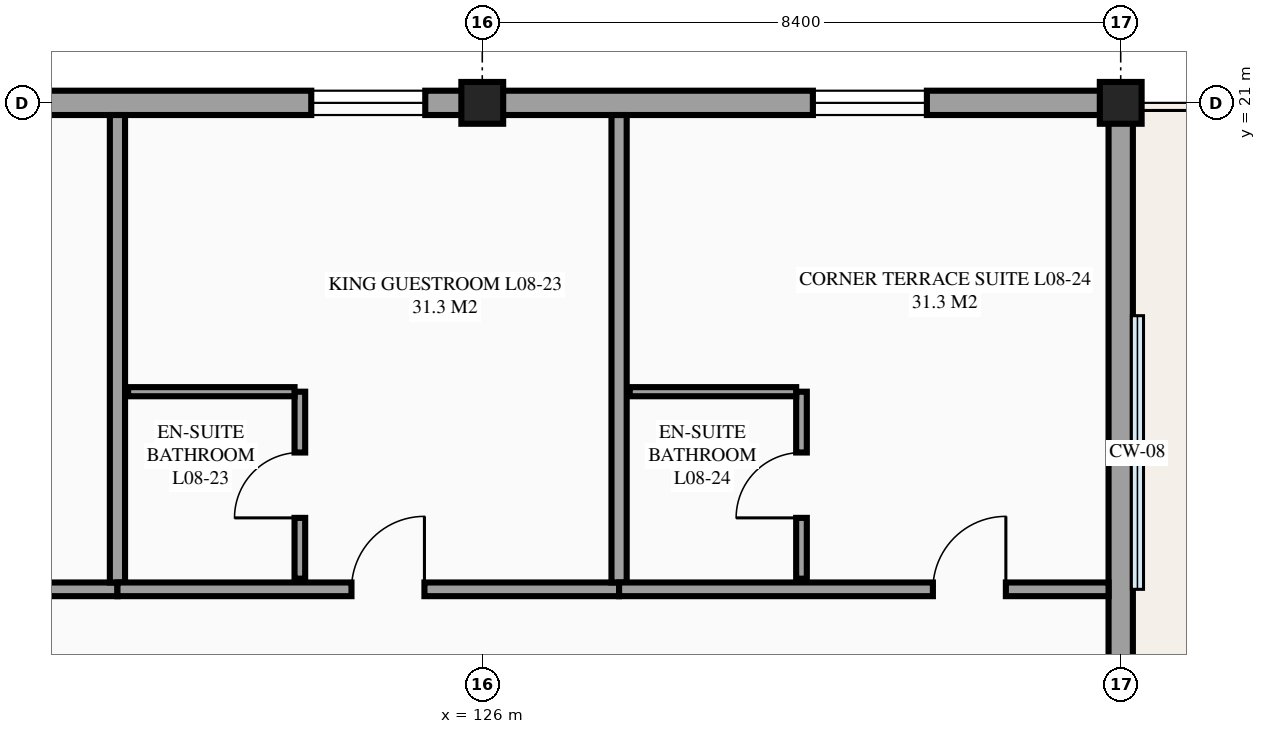
"""IFC4 building model, lengths in metres.
Left out: names, types, materials, properties, quantities, classifications, styles, units other than length and angle.
Written with IfcOpenShell. Run it as: python <this file> out.ifc"""

import sys

from ifc_helpers import new_model, si_unit, direction, frame, frame_2d, origin, origin_2d, place, context, subcontext, project, spatial, rectangle, extrude, element, fill, save


model = new_model("IFC4")
c1 = context("Model", 3, precision=1e-05, world=origin(), true_north=direction((0.0, 1.0)))
c2 = subcontext(c1, "Body", "Model", "MODEL_VIEW")
j1 = project(units=[si_unit("LENGTHUNIT", "METRE"), si_unit("PLANEANGLEUNIT", "RADIAN")], contexts=[c1])
p1 = place(None, origin())
s1 = spatial("IfcSite", under=j1, at=p1, CompositionType="ELEMENT")
p2 = place(p1, origin())
s2 = spatial("IfcBuilding", under=s1, at=p2, CompositionType="ELEMENT")
p3 = place(p2, frame((0.0, 0.0, 32.7)))
s3 = spatial("IfcBuildingStorey", under=s2, at=p3, CompositionType="ELEMENT", Elevation=32.7)
for number, where, z_axis, x_axis in (
    (1, (126.0, 21.0, 0.0), (0.0, 0.0, 1.0), (1.0, 0.0, 0.0)),
    (2, (134.4, 21.0, 0.0), (0.0, 0.0, 1.0), (1.0, 0.0, 0.0)),
):
    element("IfcColumn", number, at=place(p3, frame(where, z_axis=z_axis, x_axis=x_axis)), inside=s3, PredefinedType="COLUMN", context=c2, shape_type="SweptSolid", body=[
        extrude(rectangle(XDim=0.55, YDim=0.55, at=origin_2d()), origin(), (0.0, 0.0, 1.0), 3.6),
    ])
p4 = place(p3, frame((134.4, 4.2, 0.0), z_axis=(0.0, 0.0, 1.0), x_axis=(0.0, 1.0, 0.0)))
e3 = element("IfcWall", 3, at=p4, inside=s3, PredefinedType="STANDARD", context=c2, shape_type="SweptSolid", body=[
    extrude(rectangle(XDim=16.8, YDim=0.32, at=frame_2d((8.4, 0.0))), origin(), (0.0, 0.0, 1.0), 2.63),
])
p5 = place(p4, frame((4.8, 0.0, 0.0), z_axis=(0.0, 0.0, 1.0), x_axis=(-1.0, 0.0, 0.0)))
e4 = element("IfcOpeningElement", 4, at=p5, cuts=e3, PredefinedType="OPENING", context=c2, shape_type="SweptSolid", body=[
    extrude(rectangle(XDim=1.2, YDim=2.2, at=frame_2d((0.6, 1.1))), frame((0.0, 0.17, 0.0), z_axis=(0.0, -1.0, 0.0), x_axis=(1.0, 0.0, 0.0)), (0.0, 0.0, 1.0), 0.34),
])
p6 = place(p3, frame((134.4, 21.0, 0.0), z_axis=(0.0, 0.0, 1.0), x_axis=(-1.0, 0.0, 0.0)))
e5 = element("IfcWall", 5, at=p6, inside=s3, PredefinedType="STANDARD", context=c2, shape_type="SweptSolid", body=[
    extrude(rectangle(XDim=16.8, YDim=0.32, at=frame_2d((8.4, 0.0))), origin(), (0.0, 0.0, 1.0), 2.63),
])
p7 = place(p6, frame((14.5, 0.0, 0.85)))
e6 = element("IfcOpeningElement", 6, at=p7, cuts=e5, PredefinedType="OPENING", context=c2, shape_type="SweptSolid", body=[
    extrude(rectangle(XDim=1.5, YDim=1.5, at=frame_2d((0.75, 0.75))), frame((0.0, 0.17, 0.0), z_axis=(0.0, -1.0, 0.0), x_axis=(1.0, 0.0, 0.0)), (0.0, 0.0, 1.0), 0.34),
])
p8 = place(p6, frame((9.15, 0.0, 0.85)))
e7 = element("IfcOpeningElement", 7, at=p8, cuts=e5, PredefinedType="OPENING", context=c2, shape_type="SweptSolid", body=[
    extrude(rectangle(XDim=1.5, YDim=1.5, at=frame_2d((0.75, 0.75))), frame((0.0, 0.17, 0.0), z_axis=(0.0, -1.0, 0.0), x_axis=(1.0, 0.0, 0.0)), (0.0, 0.0, 1.0), 0.34),
])
p9 = place(p6, frame((2.55, 0.0, 0.85)))
e8 = element("IfcOpeningElement", 8, at=p9, cuts=e5, PredefinedType="OPENING", context=c2, shape_type="SweptSolid", body=[
    extrude(rectangle(XDim=1.5, YDim=1.5, at=frame_2d((0.75, 0.75))), frame((0.0, 0.17, 0.0), z_axis=(0.0, -1.0, 0.0), x_axis=(1.0, 0.0, 0.0)), (0.0, 0.0, 1.0), 0.34),
])
p10 = place(p3, frame((114.6, 14.6, 0.0), z_axis=(0.0, 0.0, 1.0), x_axis=(1.0, 0.0, 0.0)))
e9 = element("IfcWall", 9, at=p10, inside=s3, PredefinedType="PARTITIONING", context=c2, shape_type="SweptSolid", body=[
    extrude(rectangle(XDim=6.6, YDim=0.18, at=frame_2d((3.3, 0.0))), origin(), (0.0, 0.0, 1.0), 3.375),
])
p11 = place(p10, frame((4.479, 0.0, 0.0)))
e10 = element("IfcOpeningElement", 10, at=p11, cuts=e9, PredefinedType="OPENING", context=c2, shape_type="SweptSolid", body=[
    extrude(rectangle(XDim=0.96, YDim=2.15, at=frame_2d((0.48, 1.075))), frame((0.0, 0.1, 0.0), z_axis=(0.0, -1.0, 0.0), x_axis=(1.0, 0.0, 0.0)), (0.0, 0.0, 1.0), 0.2),
])
p12 = place(p3, frame((121.2, 14.69, 0.0), z_axis=(0.0, 0.0, 1.0), x_axis=(0.0, 1.0, 0.0)))
e11 = element("IfcWall", 11, at=p12, inside=s3, PredefinedType="PARTITIONING", context=c2, shape_type="SweptSolid", body=[
    extrude(rectangle(XDim=6.15, YDim=0.2, at=frame_2d((3.075, 0.0))), origin(), (0.0, 0.0, 1.0), 3.375),
])
p13 = place(p3, frame((121.2, 14.6, 0.0), z_axis=(0.0, 0.0, 1.0), x_axis=(1.0, 0.0, 0.0)))
e12 = element("IfcWall", 12, at=p13, inside=s3, PredefinedType="PARTITIONING", context=c2, shape_type="SweptSolid", body=[
    extrude(rectangle(XDim=6.6, YDim=0.18, at=frame_2d((3.3, 0.0))), origin(), (0.0, 0.0, 1.0), 3.375),
])
p14 = place(p13, frame((3.079, 0.0, 0.0)))
e13 = element("IfcOpeningElement", 13, at=p14, cuts=e12, PredefinedType="OPENING", context=c2, shape_type="SweptSolid", body=[
    extrude(rectangle(XDim=0.96, YDim=2.15, at=frame_2d((0.48, 1.075))), frame((0.0, 0.1, 0.0), z_axis=(0.0, -1.0, 0.0), x_axis=(1.0, 0.0, 0.0)), (0.0, 0.0, 1.0), 0.2),
])
p15 = place(p3, frame((127.8, 14.69, 0.0), z_axis=(0.0, 0.0, 1.0), x_axis=(0.0, 1.0, 0.0)))
e14 = element("IfcWall", 14, at=p15, inside=s3, PredefinedType="PARTITIONING", context=c2, shape_type="SweptSolid", body=[
    extrude(rectangle(XDim=6.15, YDim=0.2, at=frame_2d((3.075, 0.0))), origin(), (0.0, 0.0, 1.0), 3.375),
])
p16 = place(p3, frame((123.6, 14.74, 0.0), z_axis=(0.0, 0.0, 1.0), x_axis=(0.0, 1.0, 0.0)))
e15 = element("IfcWall", 15, at=p16, inside=s3, PredefinedType="PARTITIONING", context=c2, shape_type="SweptSolid", body=[
    extrude(rectangle(XDim=2.46, YDim=0.14, at=frame_2d((1.23, 0.0))), origin(), (0.0, 0.0, 1.0), 3.375),
])
p17 = place(p16, frame((0.8, 0.0, 0.0)))
e16 = element("IfcOpeningElement", 16, at=p17, cuts=e15, PredefinedType="OPENING", context=c2, shape_type="SweptSolid", body=[
    extrude(rectangle(XDim=0.86, YDim=2.1, at=frame_2d((0.43, 1.05))), frame((0.0, 0.08, 0.0), z_axis=(0.0, -1.0, 0.0), x_axis=(1.0, 0.0, 0.0)), (0.0, 0.0, 1.0), 0.16),
])
p18 = place(p3, frame((121.34, 17.2, 0.0), z_axis=(0.0, 0.0, 1.0), x_axis=(1.0, 0.0, 0.0)))
e17 = element("IfcWall", 17, at=p18, inside=s3, PredefinedType="PARTITIONING", context=c2, shape_type="SweptSolid", body=[
    extrude(rectangle(XDim=2.19, YDim=0.12, at=frame_2d((1.095, 0.0))), origin(), (0.0, 0.0, 1.0), 3.375),
])
p19 = place(p3, frame((127.8, 14.6, 0.0), z_axis=(0.0, 0.0, 1.0), x_axis=(1.0, 0.0, 0.0)))
e18 = element("IfcWall", 18, at=p19, inside=s3, PredefinedType="PARTITIONING", context=c2, shape_type="SweptSolid", body=[
    extrude(rectangle(XDim=6.44, YDim=0.18, at=frame_2d((3.22, 0.0))), origin(), (0.0, 0.0, 1.0), 3.375),
])
p20 = place(p19, frame((4.129, 0.0, 0.0)))
e19 = element("IfcOpeningElement", 19, at=p20, cuts=e18, PredefinedType="OPENING", context=c2, shape_type="SweptSolid", body=[
    extrude(rectangle(XDim=0.96, YDim=2.15, at=frame_2d((0.48, 1.075))), frame((0.0, 0.1, 0.0), z_axis=(0.0, -1.0, 0.0), x_axis=(1.0, 0.0, 0.0)), (0.0, 0.0, 1.0), 0.2),
])
p21 = place(p3, frame((130.2, 14.74, 0.0), z_axis=(0.0, 0.0, 1.0), x_axis=(0.0, 1.0, 0.0)))
e20 = element("IfcWall", 20, at=p21, inside=s3, PredefinedType="PARTITIONING", context=c2, shape_type="SweptSolid", body=[
    extrude(rectangle(XDim=2.46, YDim=0.14, at=frame_2d((1.23, 0.0))), origin(), (0.0, 0.0, 1.0), 3.375),
])
p22 = place(p21, frame((0.8, 0.0, 0.0)))
e21 = element("IfcOpeningElement", 21, at=p22, cuts=e20, PredefinedType="OPENING", context=c2, shape_type="SweptSolid", body=[
    extrude(rectangle(XDim=0.86, YDim=2.1, at=frame_2d((0.43, 1.05))), frame((0.0, 0.08, 0.0), z_axis=(0.0, -1.0, 0.0), x_axis=(1.0, 0.0, 0.0)), (0.0, 0.0, 1.0), 0.16),
])
p23 = place(p3, frame((127.94, 17.2, 0.0), z_axis=(0.0, 0.0, 1.0), x_axis=(1.0, 0.0, 0.0)))
e22 = element("IfcWall", 22, at=p23, inside=s3, PredefinedType="PARTITIONING", context=c2, shape_type="SweptSolid", body=[
    extrude(rectangle(XDim=2.19, YDim=0.12, at=frame_2d((1.095, 0.0))), origin(), (0.0, 0.0, 1.0), 3.375),
])
p24 = place(p8, origin())
e23 = element("IfcWindow", 23, at=p24, inside=s3, PartitioningType="SINGLE_PANEL", PredefinedType="WINDOW", context=c2, shape_type="SweptSolid", body=[
    extrude(rectangle(XDim=1.5, YDim=1.5, at=frame_2d((0.75, 0.75))), frame((0.0, 0.03, 0.0), z_axis=(0.0, -1.0, 0.0), x_axis=(1.0, 0.0, 0.0)), (0.0, 0.0, 1.0), 0.06),
])
fill(e7, e23)
p25 = place(p9, origin())
e24 = element("IfcWindow", 24, at=p25, inside=s3, PartitioningType="SINGLE_PANEL", PredefinedType="WINDOW", context=c2, shape_type="SweptSolid", body=[
    extrude(rectangle(XDim=1.5, YDim=1.5, at=frame_2d((0.75, 0.75))), frame((0.0, 0.03, 0.0), z_axis=(0.0, -1.0, 0.0), x_axis=(1.0, 0.0, 0.0)), (0.0, 0.0, 1.0), 0.06),
])
fill(e8, e24)
p26 = place(p14, origin())
e25 = element("IfcDoor", 25, at=p26, inside=s3, OperationType="SINGLE_SWING_RIGHT", PredefinedType="DOOR", context=c2, shape_type="SweptSolid", body=[
    extrude(rectangle(XDim=0.96, YDim=2.15, at=frame_2d((0.48, 1.075))), frame((0.0, 0.025, 0.0), z_axis=(0.0, -1.0, 0.0), x_axis=(1.0, 0.0, 0.0)), (0.0, 0.0, 1.0), 0.05),
])
fill(e13, e25)
p27 = place(p17, origin())
e26 = element("IfcDoor", 26, at=p27, inside=s3, OperationType="SINGLE_SWING_LEFT", PredefinedType="DOOR", context=c2, shape_type="SweptSolid", body=[
    extrude(rectangle(XDim=0.86, YDim=2.1, at=frame_2d((0.43, 1.05))), frame((0.0, 0.025, 0.0), z_axis=(0.0, -1.0, 0.0), x_axis=(1.0, 0.0, 0.0)), (0.0, 0.0, 1.0), 0.05),
])
fill(e16, e26)
p28 = place(p20, origin())
e27 = element("IfcDoor", 27, at=p28, inside=s3, OperationType="SINGLE_SWING_RIGHT", PredefinedType="DOOR", context=c2, shape_type="SweptSolid", body=[
    extrude(rectangle(XDim=0.96, YDim=2.15, at=frame_2d((0.48, 1.075))), frame((0.0, 0.025, 0.0), z_axis=(0.0, -1.0, 0.0), x_axis=(1.0, 0.0, 0.0)), (0.0, 0.0, 1.0), 0.05),
])
fill(e19, e27)
p29 = place(p22, origin())
e28 = element("IfcDoor", 28, at=p29, inside=s3, OperationType="SINGLE_SWING_LEFT", PredefinedType="DOOR", context=c2, shape_type="SweptSolid", body=[
    extrude(rectangle(XDim=0.86, YDim=2.1, at=frame_2d((0.43, 1.05))), frame((0.0, 0.025, 0.0), z_axis=(0.0, -1.0, 0.0), x_axis=(1.0, 0.0, 0.0)), (0.0, 0.0, 1.0), 0.05),
])
fill(e21, e28)
save(model, sys.argv[1])
